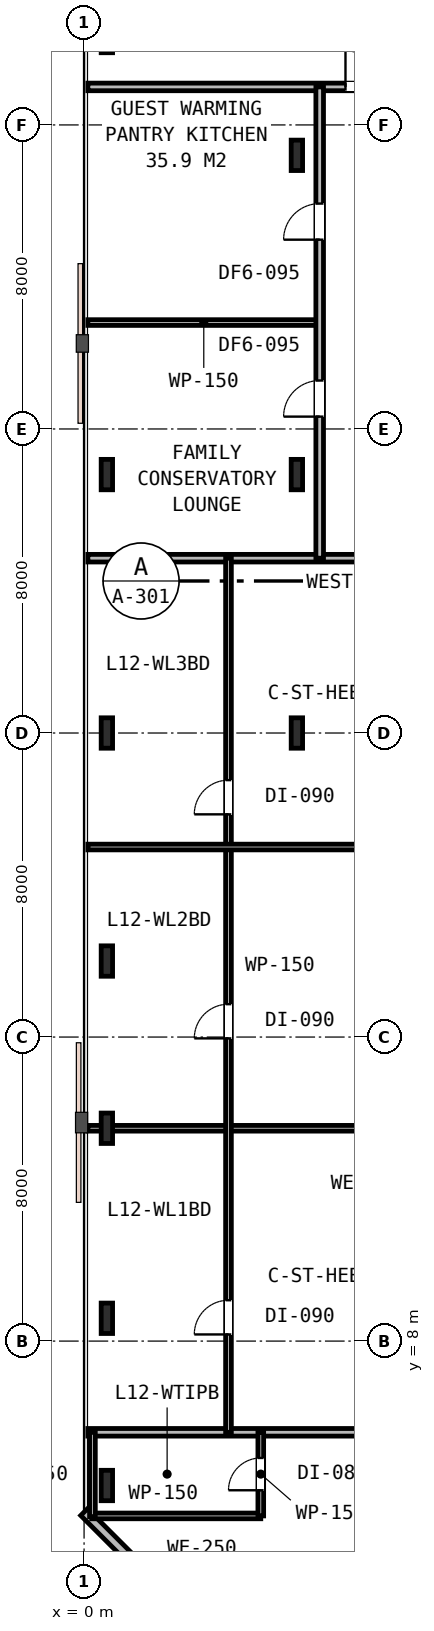
"""IFC4 building model, lengths in metres.
Left out: names, types, materials, properties, quantities, classifications, styles, units other than length and angle.
Written with IfcOpenShell. Run it as: python <this file> out.ifc"""

import sys

from ifc_helpers import new_model, si_unit, direction, frame, frame_2d, origin, origin_2d, place, context, subcontext, project, spatial, rectangle, i_section, extrude, element, fill, save


model = new_model("IFC4")
c1 = context("Model", 3, precision=1e-05, world=origin(), true_north=direction((0.0, 1.0)))
c2 = subcontext(c1, "Body", "Model", "MODEL_VIEW")
j1 = project(units=[si_unit("LENGTHUNIT", "METRE"), si_unit("PLANEANGLEUNIT", "RADIAN")], contexts=[c1])
p1 = place(None, origin())
s1 = spatial("IfcSite", under=j1, at=p1, CompositionType="ELEMENT")
p2 = place(p1, origin())
s2 = spatial("IfcBuilding", under=s1, at=p2, CompositionType="ELEMENT")
p3 = place(p2, frame((0.0, 0.0, 51.0)))
s3 = spatial("IfcBuildingStorey", under=s2, at=p3, CompositionType="ELEMENT", Elevation=51.0)
for number, where, z_axis, x_axis in (
    (1, (5.6, 24.0, 0.0), (0.0, 0.0, 1.0), (1.0, 0.0, 0.0)),
    (2, (5.6, 30.8, 0.0), (0.0, 0.0, 1.0), (1.0, 0.0, 0.0)),
    (3, (5.6, 39.2, 0.0), (0.0, 0.0, 1.0), (1.0, 0.0, 0.0)),
    (4, (0.6, 24.0, 0.0), (0.0, 0.0, 1.0), (1.0, 0.0, 0.0)),
    (5, (0.6, 30.8, 0.0), (0.0, 0.0, 1.0), (1.0, 0.0, 0.0)),
    (6, (0.6, 42.3, 0.0), (0.0, 0.0, 1.0), (1.0, 0.0, 0.0)),
    (7, (0.6, 8.6, 0.0), (0.0, 0.0, 1.0), (1.0, 0.0, 0.0)),
    (8, (0.6, 13.6, 0.0), (0.0, 0.0, 1.0), (1.0, 0.0, 0.0)),
    (9, (0.6, 18.0, 0.0), (0.0, 0.0, 1.0), (1.0, 0.0, 0.0)),
    (10, (0.6, 4.2, 0.0), (0.0, 0.0, 1.0), (1.0, 0.0, 0.0)),
):
    element("IfcColumn", number, at=place(p3, frame(where, z_axis=z_axis, x_axis=x_axis)), inside=s3, PredefinedType="COLUMN", context=c2, shape_type="SweptSolid", body=[
        extrude(i_section(OverallWidth=0.3, OverallDepth=0.8, WebThickness=0.018, FlangeThickness=0.033, FilletRadius=0.03, at=origin_2d()), origin(), (0.0, 0.0, 1.0), 3.6),
    ])
p4 = place(p3, frame((0.0, 3.5, 0.0), z_axis=(0.0, 0.0, 1.0), x_axis=(0.707106781187, -0.707106781187, 0.0)))
e11 = element("IfcWall", 11, at=p4, inside=s3, PredefinedType="STANDARD", context=c2, shape_type="SweptSolid", body=[
    extrude(rectangle(XDim=4.95, YDim=0.25, at=frame_2d((2.475, 0.0))), origin(), (0.0, 0.0, 1.0), 3.33),
])
p5 = place(p4, frame((1.685, 0.0, 0.75)))
e12 = element("IfcOpeningElement", 12, at=p5, cuts=e11, PredefinedType="OPENING", context=c2, shape_type="SweptSolid", body=[
    extrude(rectangle(XDim=1.8, YDim=1.85, at=frame_2d((0.9, 0.925))), frame((0.0, 0.135, 0.0), z_axis=(0.0, -1.0, 0.0), x_axis=(1.0, 0.0, 0.0)), (0.0, 0.0, 1.0), 0.27),
])
p6 = place(p3, frame((0.1, 28.6, 0.0), z_axis=(0.0, 0.0, 1.0), x_axis=(1.0, 0.0, 0.0)))
e13 = element("IfcWall", 13, at=p6, inside=s3, PredefinedType="PARTITIONING", context=c2, shape_type="SweptSolid", body=[
    extrude(rectangle(XDim=19.5, YDim=0.2, at=frame_2d((9.75, 0.0))), origin(), (0.0, 0.0, 1.0), 2.82),
])
p7 = place(p3, frame((0.1, 41.0, 0.0), z_axis=(0.0, 0.0, 1.0), x_axis=(1.0, 0.0, 0.0)))
e14 = element("IfcWall", 14, at=p7, inside=s3, PredefinedType="PARTITIONING", context=c2, shape_type="SweptSolid", body=[
    extrude(rectangle(XDim=15.9, YDim=0.2, at=frame_2d((7.95, 0.0))), origin(), (0.0, 0.0, 1.0), 2.82),
])
p8 = place(p7, frame((6.779, 0.0, 0.0)))
e15 = element("IfcOpeningElement", 15, at=p8, cuts=e14, PredefinedType="OPENING", context=c2, shape_type="SweptSolid", body=[
    extrude(rectangle(XDim=0.95, YDim=2.15, at=frame_2d((0.475, 1.075))), frame((0.0, 0.11, 0.0), z_axis=(0.0, -1.0, 0.0), x_axis=(1.0, 0.0, 0.0)), (0.0, 0.0, 1.0), 0.22),
])
p9 = place(p3, frame((0.1, 34.8, 0.0), z_axis=(0.0, 0.0, 1.0), x_axis=(1.0, 0.0, 0.0)))
e16 = element("IfcWall", 16, at=p9, inside=s3, PredefinedType="PARTITIONING", context=c2, shape_type="SweptSolid", body=[
    extrude(rectangle(XDim=6.1, YDim=0.15, at=frame_2d((3.05, 0.0))), origin(), (0.0, 0.0, 1.0), 2.82),
])
p10 = place(p3, frame((6.2, 28.6, 0.0), z_axis=(0.0, 0.0, 1.0), x_axis=(0.0, 1.0, 0.0)))
e17 = element("IfcWall", 17, at=p10, inside=s3, PredefinedType="PARTITIONING", context=c2, shape_type="SweptSolid", body=[
    extrude(rectangle(XDim=12.4, YDim=0.2, at=frame_2d((6.2, 0.0))), origin(), (0.0, 0.0, 1.0), 2.82),
])
p11 = place(p10, frame((3.725, 0.0, 0.0)))
e18 = element("IfcOpeningElement", 18, at=p11, cuts=e17, PredefinedType="OPENING", context=c2, shape_type="SweptSolid", body=[
    extrude(rectangle(XDim=0.95, YDim=2.15, at=frame_2d((0.475, 1.075))), frame((0.0, 0.11, 0.0), z_axis=(0.0, -1.0, 0.0), x_axis=(1.0, 0.0, 0.0)), (0.0, 0.0, 1.0), 0.22),
])
p12 = place(p10, frame((8.381, 0.0, 0.0)))
e19 = element("IfcOpeningElement", 19, at=p12, cuts=e17, PredefinedType="OPENING", context=c2, shape_type="SweptSolid", body=[
    extrude(rectangle(XDim=0.95, YDim=2.15, at=frame_2d((0.475, 1.075))), frame((0.0, 0.11, 0.0), z_axis=(0.0, -1.0, 0.0), x_axis=(1.0, 0.0, 0.0)), (0.0, 0.0, 1.0), 0.22),
])
p13 = place(p3, frame((0.1, 5.6, 0.0), z_axis=(0.0, 0.0, 1.0), x_axis=(1.0, 0.0, 0.0)))
e20 = element("IfcWall", 20, at=p13, inside=s3, PredefinedType="PARTITIONING", context=c2, shape_type="SweptSolid", body=[
    extrude(rectangle(XDim=19.5, YDim=0.2, at=frame_2d((9.75, 0.0))), origin(), (0.0, 0.0, 1.0), 2.82),
])
p14 = place(p3, frame((0.2, 3.4, 0.0), z_axis=(0.0, 0.0, 1.0), x_axis=(1.0, 0.0, 0.0)))
e21 = element("IfcWall", 21, at=p14, inside=s3, PredefinedType="PARTITIONING", context=c2, shape_type="SweptSolid", body=[
    extrude(rectangle(XDim=4.45, YDim=0.15, at=frame_2d((2.225, 0.0))), origin(), (0.0, 0.0, 1.0), 3.33),
])
p15 = place(p3, frame((4.65, 3.4, 0.0), z_axis=(0.0, 0.0, 1.0), x_axis=(0.0, 1.0, 0.0)))
e22 = element("IfcWall", 22, at=p15, inside=s3, PredefinedType="PARTITIONING", context=c2, shape_type="SweptSolid", body=[
    extrude(rectangle(XDim=2.2, YDim=0.15, at=frame_2d((1.1, 0.0))), origin(), (0.0, 0.0, 1.0), 3.33),
])
p16 = place(p15, frame((0.675, 0.0, 0.0)))
e23 = element("IfcOpeningElement", 23, at=p16, cuts=e22, PredefinedType="OPENING", context=c2, shape_type="SweptSolid", body=[
    extrude(rectangle(XDim=0.85, YDim=2.15, at=frame_2d((0.425, 1.075))), frame((0.0, 0.085, 0.0), z_axis=(0.0, -1.0, 0.0), x_axis=(1.0, 0.0, 0.0)), (0.0, 0.0, 1.0), 0.17),
])
p17 = place(p3, frame((0.22, 3.38, 0.0), z_axis=(0.0, 0.0, 1.0), x_axis=(0.0, 1.0, 0.0)))
e24 = element("IfcWall", 24, at=p17, inside=s3, PredefinedType="PARTITIONING", context=c2, shape_type="SweptSolid", body=[
    extrude(rectangle(XDim=2.22, YDim=0.15, at=frame_2d((1.11, 0.0))), origin(), (0.0, 0.0, 1.0), 2.93),
])
p18 = place(p3, frame((0.1, 13.6, 0.0), z_axis=(0.0, 0.0, 1.0), x_axis=(1.0, 0.0, 0.0)))
e25 = element("IfcWall", 25, at=p18, inside=s3, PredefinedType="PARTITIONING", context=c2, shape_type="SweptSolid", body=[
    extrude(rectangle(XDim=19.5, YDim=0.15, at=frame_2d((9.75, 0.0))), origin(), (0.0, 0.0, 1.0), 2.82),
])
p19 = place(p3, frame((3.8, 5.6, 0.0), z_axis=(0.0, 0.0, 1.0), x_axis=(0.0, 1.0, 0.0)))
e26 = element("IfcWall", 26, at=p19, inside=s3, PredefinedType="PARTITIONING", context=c2, shape_type="SweptSolid", body=[
    extrude(rectangle(XDim=23.0, YDim=0.15, at=frame_2d((11.5, 0.0))), origin(), (0.0, 0.0, 1.0), 2.82),
])
p20 = place(p19, frame((2.575, 0.0, 0.0)))
e27 = element("IfcOpeningElement", 27, at=p20, cuts=e26, PredefinedType="OPENING", context=c2, shape_type="SweptSolid", body=[
    extrude(rectangle(XDim=0.9, YDim=2.15, at=frame_2d((0.45, 1.075))), frame((0.0, 0.085, 0.0), z_axis=(0.0, -1.0, 0.0), x_axis=(1.0, 0.0, 0.0)), (0.0, 0.0, 1.0), 0.17),
])
p21 = place(p19, frame((10.365, 0.0, 0.0)))
e28 = element("IfcOpeningElement", 28, at=p21, cuts=e26, PredefinedType="OPENING", context=c2, shape_type="SweptSolid", body=[
    extrude(rectangle(XDim=0.9, YDim=2.15, at=frame_2d((0.45, 1.075))), frame((0.0, 0.085, 0.0), z_axis=(0.0, -1.0, 0.0), x_axis=(1.0, 0.0, 0.0)), (0.0, 0.0, 1.0), 0.17),
])
p22 = place(p19, frame((16.26, 0.0, 0.0)))
e29 = element("IfcOpeningElement", 29, at=p22, cuts=e26, PredefinedType="OPENING", context=c2, shape_type="SweptSolid", body=[
    extrude(rectangle(XDim=0.9, YDim=2.15, at=frame_2d((0.45, 1.075))), frame((0.0, 0.085, 0.0), z_axis=(0.0, -1.0, 0.0), x_axis=(1.0, 0.0, 0.0)), (0.0, 0.0, 1.0), 0.17),
])
p23 = place(p3, frame((0.1, 21.0, 0.0), z_axis=(0.0, 0.0, 1.0), x_axis=(1.0, 0.0, 0.0)))
e30 = element("IfcWall", 30, at=p23, inside=s3, PredefinedType="PARTITIONING", context=c2, shape_type="SweptSolid", body=[
    extrude(rectangle(XDim=19.5, YDim=0.15, at=frame_2d((9.75, 0.0))), origin(), (0.0, 0.0, 1.0), 2.82),
])
p24 = place(p8, origin())
e31 = element("IfcDoor", 31, at=p24, inside=s3, OperationType="SINGLE_SWING_LEFT", PredefinedType="DOOR", context=c2, shape_type="SweptSolid", body=[
    extrude(rectangle(XDim=0.95, YDim=2.15, at=frame_2d((0.475, 1.075))), frame((0.0, 0.025, 0.0), z_axis=(0.0, -1.0, 0.0), x_axis=(1.0, 0.0, 0.0)), (0.0, 0.0, 1.0), 0.05),
])
fill(e15, e31)
p25 = place(p11, origin())
e32 = element("IfcDoor", 32, at=p25, inside=s3, OperationType="SINGLE_SWING_LEFT", PredefinedType="DOOR", context=c2, shape_type="SweptSolid", body=[
    extrude(rectangle(XDim=0.95, YDim=2.15, at=frame_2d((0.475, 1.075))), frame((0.0, 0.025, 0.0), z_axis=(0.0, -1.0, 0.0), x_axis=(1.0, 0.0, 0.0)), (0.0, 0.0, 1.0), 0.05),
])
fill(e18, e32)
p26 = place(p12, origin())
e33 = element("IfcDoor", 33, at=p26, inside=s3, OperationType="SINGLE_SWING_LEFT", PredefinedType="DOOR", context=c2, shape_type="SweptSolid", body=[
    extrude(rectangle(XDim=0.95, YDim=2.15, at=frame_2d((0.475, 1.075))), frame((0.0, 0.025, 0.0), z_axis=(0.0, -1.0, 0.0), x_axis=(1.0, 0.0, 0.0)), (0.0, 0.0, 1.0), 0.05),
])
fill(e19, e33)
p27 = place(p16, origin())
e34 = element("IfcDoor", 34, at=p27, inside=s3, OperationType="SINGLE_SWING_LEFT", PredefinedType="DOOR", context=c2, shape_type="SweptSolid", body=[
    extrude(rectangle(XDim=0.85, YDim=2.15, at=frame_2d((0.425, 1.075))), frame((0.0, 0.025, 0.0), z_axis=(0.0, -1.0, 0.0), x_axis=(1.0, 0.0, 0.0)), (0.0, 0.0, 1.0), 0.05),
])
fill(e23, e34)
p28 = place(p20, origin())
e35 = element("IfcDoor", 35, at=p28, inside=s3, OperationType="SINGLE_SWING_LEFT", PredefinedType="DOOR", context=c2, shape_type="SweptSolid", body=[
    extrude(rectangle(XDim=0.9, YDim=2.15, at=frame_2d((0.45, 1.075))), frame((0.0, 0.025, 0.0), z_axis=(0.0, -1.0, 0.0), x_axis=(1.0, 0.0, 0.0)), (0.0, 0.0, 1.0), 0.05),
])
fill(e27, e35)
p29 = place(p21, origin())
e36 = element("IfcDoor", 36, at=p29, inside=s3, OperationType="SINGLE_SWING_LEFT", PredefinedType="DOOR", context=c2, shape_type="SweptSolid", body=[
    extrude(rectangle(XDim=0.9, YDim=2.15, at=frame_2d((0.45, 1.075))), frame((0.0, 0.025, 0.0), z_axis=(0.0, -1.0, 0.0), x_axis=(1.0, 0.0, 0.0)), (0.0, 0.0, 1.0), 0.05),
])
fill(e28, e36)
p30 = place(p22, origin())
e37 = element("IfcDoor", 37, at=p30, inside=s3, OperationType="SINGLE_SWING_LEFT", PredefinedType="DOOR", context=c2, shape_type="SweptSolid", body=[
    extrude(rectangle(XDim=0.9, YDim=2.15, at=frame_2d((0.45, 1.075))), frame((0.0, 0.025, 0.0), z_axis=(0.0, -1.0, 0.0), x_axis=(1.0, 0.0, 0.0)), (0.0, 0.0, 1.0), 0.05),
])
fill(e29, e37)
save(model, sys.argv[1])
